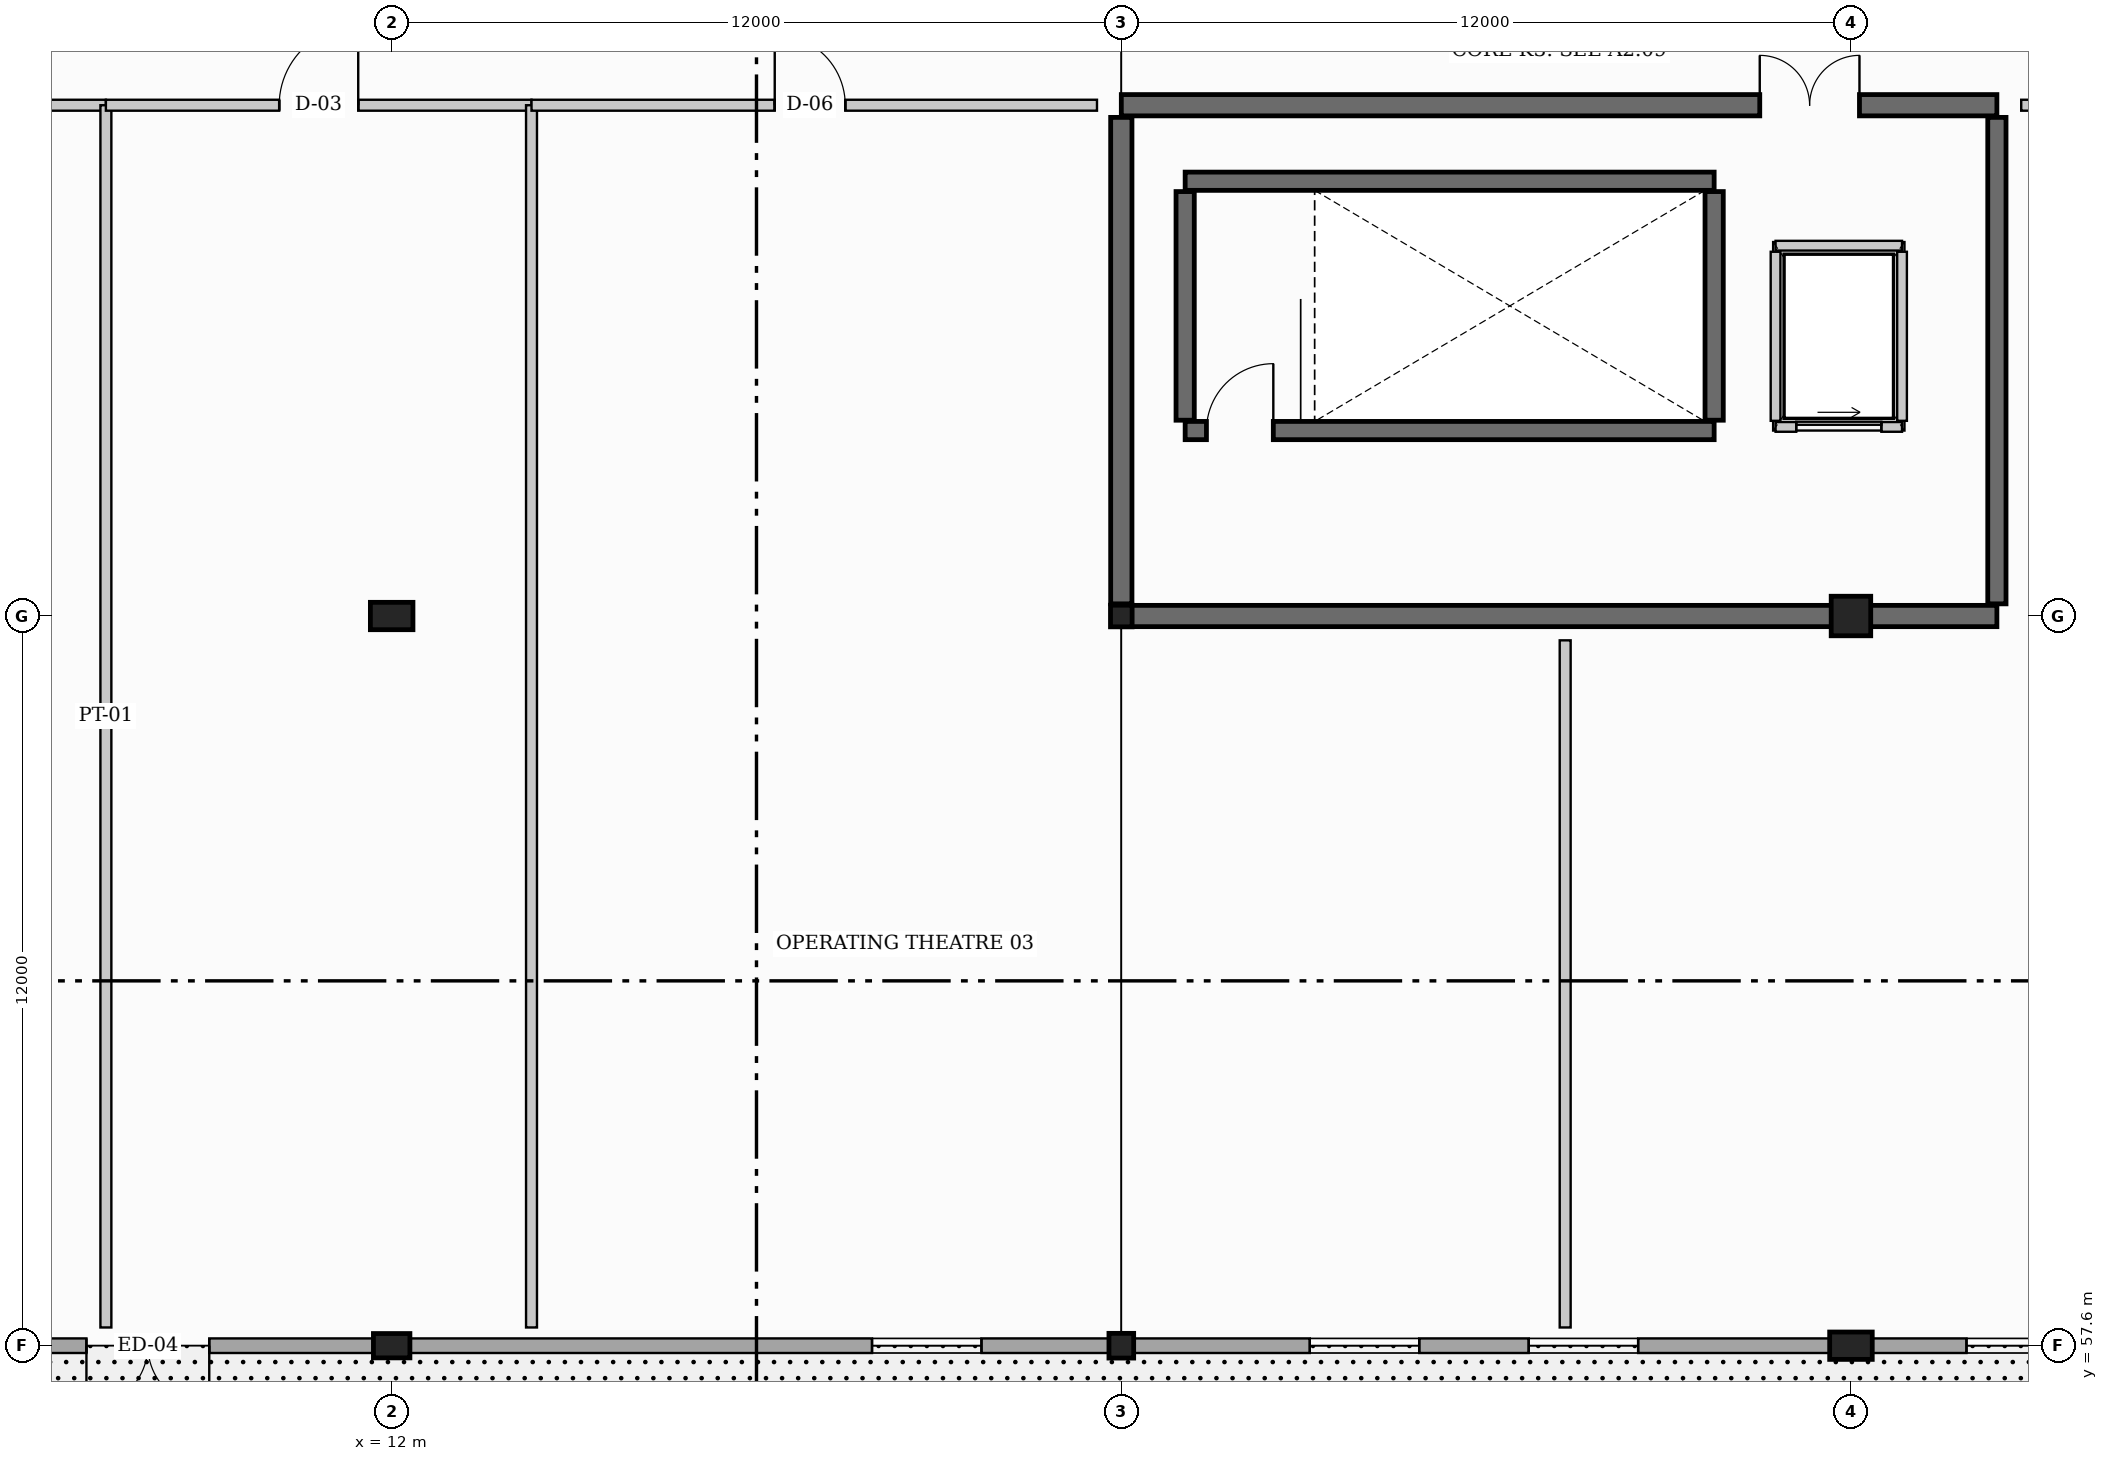
"""IFC4 building model, lengths in metres.
Left out: names, types, materials, properties, quantities, classifications, styles, units other than length and angle.
Written with IfcOpenShell. Run it as: python <this file> out.ifc"""

import sys

from ifc_helpers import new_model, si_unit, direction, frame, frame_2d, origin, origin_2d, place, context, subcontext, project, spatial, rectangle, hollow_circle, extrude, element, fill, save


model = new_model("IFC4")
c1 = context("Model", 3, precision=1e-05, world=origin(), true_north=direction((0.0, 1.0)))
c2 = subcontext(c1, "Body", "Model", "MODEL_VIEW")
j1 = project(units=[si_unit("LENGTHUNIT", "METRE"), si_unit("PLANEANGLEUNIT", "RADIAN")], contexts=[c1])
p1 = place(None, origin())
s1 = spatial("IfcSite", under=j1, at=p1, CompositionType="ELEMENT")
p2 = place(p1, origin())
s2 = spatial("IfcBuilding", under=s1, at=p2, CompositionType="ELEMENT")
p3 = place(p2, frame((0.0, 0.0, 9.6)))
s3 = spatial("IfcBuildingStorey", under=s2, at=p3, CompositionType="ELEMENT", Elevation=9.6)
p4 = place(p3, frame((12.0, 57.6, 0.0), z_axis=(0.0, 0.0, 1.0), x_axis=(0.0, 1.0, 0.0)))
e1 = element("IfcColumn", 1, at=p4, inside=s3, PredefinedType="PILASTER", context=c2, shape_type="SweptSolid", body=[
    extrude(rectangle(XDim=0.4, YDim=0.6, at=origin_2d()), origin(), (0.0, 0.0, 1.0), 4.8),
])
p5 = place(p3, frame((12.0, 69.6, 0.0), z_axis=(0.0, 0.0, 1.0), x_axis=(0.0, 1.0, 0.0)))
e2 = element("IfcColumn", 2, at=p5, inside=s3, PredefinedType="PILASTER", context=c2, shape_type="SweptSolid", body=[
    extrude(rectangle(XDim=0.45, YDim=0.7, at=origin_2d()), origin(), (0.0, 0.0, 1.0), 4.8),
])
p6 = place(p3, frame((24.0, 57.6, 0.0), z_axis=(0.0, 0.0, 1.0), x_axis=(1.0, 0.0, 0.0)))
e3 = element("IfcColumn", 3, at=p6, inside=s3, PredefinedType="COLUMN", context=c2, shape_type="SweptSolid", body=[
    extrude(hollow_circle(Radius=0.203, WallThickness=0.016, at=origin_2d()), origin(), (0.0, 0.0, 1.0), 4.8),
])
p7 = place(p3, frame((24.0, 69.6, 0.0), z_axis=(0.0, 0.0, 1.0), x_axis=(1.0, 0.0, 0.0)))
e4 = element("IfcColumn", 4, at=p7, inside=s3, PredefinedType="COLUMN", context=c2, shape_type="SweptSolid", body=[
    extrude(hollow_circle(Radius=0.178, WallThickness=0.013, at=origin_2d()), origin(), (0.0, 0.0, 1.0), 4.8),
])
p8 = place(p3, frame((36.0, 57.6, 0.0), z_axis=(0.0, 0.0, 1.0), x_axis=(0.0, 1.0, 0.0)))
e5 = element("IfcColumn", 5, at=p8, inside=s3, PredefinedType="PILASTER", context=c2, shape_type="SweptSolid", body=[
    extrude(rectangle(XDim=0.45, YDim=0.7, at=origin_2d()), origin(), (0.0, 0.0, 1.0), 4.8),
])
p9 = place(p3, frame((36.0, 69.6, 0.0), z_axis=(0.0, 0.0, 1.0), x_axis=(0.0, 1.0, 0.0)))
e6 = element("IfcColumn", 6, at=p9, inside=s3, PredefinedType="COLUMN", context=c2, shape_type="SweptSolid", body=[
    extrude(rectangle(XDim=0.65, YDim=0.65, at=origin_2d()), origin(), (0.0, 0.0, 1.0), 4.8),
])
p10 = place(p3, frame((24.0, 78.0, 0.0), z_axis=(0.0, 0.0, 1.0), x_axis=(1.0, 0.0, 0.0)))
e7 = element("IfcWall", 7, at=p10, inside=s3, PredefinedType="SHEAR", context=c2, shape_type="SweptSolid", body=[
    extrude(rectangle(XDim=14.4, YDim=0.35, at=frame_2d((7.2, 0.0))), origin(), (0.0, 0.0, 1.0), 4.8),
])
p11 = place(p10, frame((10.5, 0.0, 0.0)))
e8 = element("IfcOpeningElement", 8, at=p11, cuts=e7, PredefinedType="OPENING", context=c2, shape_type="SweptSolid", body=[
    extrude(rectangle(XDim=1.64, YDim=2.2, at=frame_2d((0.82, 1.1))), frame((0.0, 0.185, 0.0), z_axis=(0.0, -1.0, 0.0), x_axis=(1.0, 0.0, 0.0)), (0.0, 0.0, 1.0), 0.37),
])
p12 = place(p3, frame((38.4, 69.6, 0.0), z_axis=(0.0, 0.0, 1.0), x_axis=(-1.0, 0.0, 0.0)))
e9 = element("IfcWall", 9, at=p12, inside=s3, PredefinedType="SHEAR", context=c2, shape_type="SweptSolid", body=[
    extrude(rectangle(XDim=14.4, YDim=0.35, at=frame_2d((7.2, 0.0))), origin(), (0.0, 0.0, 1.0), 4.8),
])
p13 = place(p3, frame((24.0, 69.8, 0.0), z_axis=(0.0, 0.0, 1.0), x_axis=(0.0, 1.0, 0.0)))
e10 = element("IfcWall", 10, at=p13, inside=s3, PredefinedType="SHEAR", context=c2, shape_type="SweptSolid", body=[
    extrude(rectangle(XDim=8.0, YDim=0.35, at=frame_2d((4.0, 0.0))), origin(), (0.0, 0.0, 1.0), 4.8),
])
p14 = place(p3, frame((38.4, 77.8, 0.0), z_axis=(0.0, 0.0, 1.0), x_axis=(0.0, -1.0, 0.0)))
e11 = element("IfcWall", 11, at=p14, inside=s3, PredefinedType="SHEAR", context=c2, shape_type="SweptSolid", body=[
    extrude(rectangle(XDim=8.0, YDim=0.3, at=frame_2d((4.0, 0.0))), origin(), (0.0, 0.0, 1.0), 4.8),
])
p15 = place(p3, frame((25.05, 72.65, 0.0), z_axis=(0.0, 0.0, 1.0), x_axis=(1.0, 0.0, 0.0)))
e12 = element("IfcWall", 12, at=p15, inside=s3, PredefinedType="SHEAR", context=c2, shape_type="SweptSolid", body=[
    extrude(rectangle(XDim=8.7, YDim=0.3, at=frame_2d((4.35, 0.0))), origin(), (0.0, 0.0, 1.0), 4.8),
])
p16 = place(p15, frame((0.35, 0.0, 0.0)))
e13 = element("IfcOpeningElement", 13, at=p16, cuts=e12, PredefinedType="OPENING", context=c2, shape_type="SweptSolid", body=[
    extrude(rectangle(XDim=1.1, YDim=2.15, at=frame_2d((0.55, 1.075))), frame((0.0, 0.16, 0.0), z_axis=(0.0, -1.0, 0.0), x_axis=(1.0, 0.0, 0.0)), (0.0, 0.0, 1.0), 0.32),
])
p17 = place(p3, frame((33.75, 76.75, 0.0), z_axis=(0.0, 0.0, 1.0), x_axis=(-1.0, 0.0, 0.0)))
e14 = element("IfcWall", 14, at=p17, inside=s3, PredefinedType="SHEAR", context=c2, shape_type="SweptSolid", body=[
    extrude(rectangle(XDim=8.7, YDim=0.3, at=frame_2d((4.35, 0.0))), origin(), (0.0, 0.0, 1.0), 4.8),
])
for number, where, z_axis, x_axis in (
    (15, (25.05, 72.82, 0.0), (0.0, 0.0, 1.0), (0.0, 1.0, 0.0)),
    (16, (33.75, 72.82, 0.0), (0.0, 0.0, 1.0), (0.0, 1.0, 0.0)),
):
    element("IfcWall", number, at=place(p3, frame(where, z_axis=z_axis, x_axis=x_axis)), inside=s3, PredefinedType="SHEAR", context=c2, shape_type="SweptSolid", body=[
        extrude(rectangle(XDim=3.76, YDim=0.3, at=frame_2d((1.88, 0.0))), origin(), (0.0, 0.0, 1.0), 4.8),
    ])
p18 = place(p3, frame((48.0, 57.6, 0.0), z_axis=(0.0, 0.0, 1.0), x_axis=(-1.0, 0.0, 0.0)))
e17 = element("IfcWall", 17, at=p18, inside=s3, PredefinedType="STANDARD", context=c2, shape_type="SweptSolid", body=[
    extrude(rectangle(XDim=48.0, YDim=0.24, at=frame_2d((24.0, 0.0))), origin(), (0.0, 0.0, 1.0), 3.465),
])
p19 = place(p18, frame((39.0, 0.0, 0.0)))
e18 = element("IfcOpeningElement", 18, at=p19, cuts=e17, PredefinedType="OPENING", context=c2, shape_type="SweptSolid", body=[
    extrude(rectangle(XDim=2.02, YDim=2.2, at=frame_2d((1.01, 1.1))), frame((0.0, 0.13, 0.0), z_axis=(0.0, -1.0, 0.0), x_axis=(1.0, 0.0, 0.0)), (0.0, 0.0, 1.0), 0.26),
])
p20 = place(p18, frame((1.1, 0.0, 2.1)))
e19 = element("IfcOpeningElement", 19, at=p20, cuts=e17, PredefinedType="OPENING", context=c2, shape_type="SweptSolid", body=[
    extrude(rectangle(XDim=1.8, YDim=0.9, at=frame_2d((0.9, 0.45))), frame((0.0, 0.13, 0.0), z_axis=(0.0, -1.0, 0.0), x_axis=(1.0, 0.0, 0.0)), (0.0, 0.0, 1.0), 0.26),
])
p21 = place(p18, frame((8.3, 0.0, 2.1)))
e20 = element("IfcOpeningElement", 20, at=p21, cuts=e17, PredefinedType="OPENING", context=c2, shape_type="SweptSolid", body=[
    extrude(rectangle(XDim=1.8, YDim=0.9, at=frame_2d((0.9, 0.45))), frame((0.0, 0.13, 0.0), z_axis=(0.0, -1.0, 0.0), x_axis=(1.0, 0.0, 0.0)), (0.0, 0.0, 1.0), 0.26),
])
p22 = place(p18, frame((15.5, 0.0, 2.1)))
e21 = element("IfcOpeningElement", 21, at=p22, cuts=e17, PredefinedType="OPENING", context=c2, shape_type="SweptSolid", body=[
    extrude(rectangle(XDim=1.8, YDim=0.9, at=frame_2d((0.9, 0.45))), frame((0.0, 0.13, 0.0), z_axis=(0.0, -1.0, 0.0), x_axis=(1.0, 0.0, 0.0)), (0.0, 0.0, 1.0), 0.26),
])
p23 = place(p18, frame((19.1, 0.0, 2.1)))
e22 = element("IfcOpeningElement", 22, at=p23, cuts=e17, PredefinedType="OPENING", context=c2, shape_type="SweptSolid", body=[
    extrude(rectangle(XDim=1.8, YDim=0.9, at=frame_2d((0.9, 0.45))), frame((0.0, 0.13, 0.0), z_axis=(0.0, -1.0, 0.0), x_axis=(1.0, 0.0, 0.0)), (0.0, 0.0, 1.0), 0.26),
])
p24 = place(p18, frame((26.3, 0.0, 2.1)))
e23 = element("IfcOpeningElement", 23, at=p24, cuts=e17, PredefinedType="OPENING", context=c2, shape_type="SweptSolid", body=[
    extrude(rectangle(XDim=1.8, YDim=0.9, at=frame_2d((0.9, 0.45))), frame((0.0, 0.13, 0.0), z_axis=(0.0, -1.0, 0.0), x_axis=(1.0, 0.0, 0.0)), (0.0, 0.0, 1.0), 0.26),
])
p25 = place(p18, frame((44.3, 0.0, 2.1)))
e24 = element("IfcOpeningElement", 24, at=p25, cuts=e17, PredefinedType="OPENING", context=c2, shape_type="SweptSolid", body=[
    extrude(rectangle(XDim=1.8, YDim=0.9, at=frame_2d((0.9, 0.45))), frame((0.0, 0.13, 0.0), z_axis=(0.0, -1.0, 0.0), x_axis=(1.0, 0.0, 0.0)), (0.0, 0.0, 1.0), 0.26),
])
p26 = place(p3, frame((34.76, 72.71, 0.0), z_axis=(0.0, 0.0, 1.0), x_axis=(1.0, 0.0, 0.0)))
e25 = element("IfcWall", 25, at=p26, inside=s3, PredefinedType="PARTITIONING", context=c2, shape_type="SweptSolid", body=[
    extrude(rectangle(XDim=2.08, YDim=0.16, at=frame_2d((1.04, 0.0))), origin(), (0.0, 0.0, 1.0), 4.43),
])
p27 = place(p26, frame((0.34, 0.0, 0.0)))
e26 = element("IfcOpeningElement", 26, at=p27, cuts=e25, PredefinedType="OPENING", context=c2, shape_type="SweptSolid", body=[
    extrude(rectangle(XDim=1.4, YDim=2.2, at=frame_2d((0.7, 1.1))), frame((0.0, 0.09, 0.0), z_axis=(0.0, -1.0, 0.0), x_axis=(1.0, 0.0, 0.0)), (0.0, 0.0, 1.0), 0.18),
])
p28 = place(p3, frame((36.84, 75.69, 0.0), z_axis=(0.0, 0.0, 1.0), x_axis=(-1.0, 0.0, 0.0)))
e27 = element("IfcWall", 27, at=p28, inside=s3, PredefinedType="PARTITIONING", context=c2, shape_type="SweptSolid", body=[
    extrude(rectangle(XDim=2.08, YDim=0.16, at=frame_2d((1.04, 0.0))), origin(), (0.0, 0.0, 1.0), 4.43),
])
for number, where, z_axis, x_axis in (
    (28, (34.76, 75.59, 0.0), (0.0, 0.0, 1.0), (0.0, -1.0, 0.0)),
    (29, (36.84, 72.81, 0.0), (0.0, 0.0, 1.0), (0.0, 1.0, 0.0)),
):
    element("IfcWall", number, at=place(p3, frame(where, z_axis=z_axis, x_axis=x_axis)), inside=s3, PredefinedType="PARTITIONING", context=c2, shape_type="SweptSolid", body=[
        extrude(rectangle(XDim=2.78, YDim=0.16, at=frame_2d((1.39, 0.0))), origin(), (0.0, 0.0, 1.0), 4.43),
    ])
p29 = place(p3, frame((0.3, 78.0, 0.0), z_axis=(0.0, 0.0, 1.0), x_axis=(1.0, 0.0, 0.0)))
e30 = element("IfcWall", 30, at=p29, inside=s3, PredefinedType="PARTITIONING", context=c2, shape_type="SweptSolid", body=[
    extrude(rectangle(XDim=7.0, YDim=0.18, at=frame_2d((3.5, 0.0))), origin(), (0.0, 0.0, 1.0), 4.065),
])
p30 = place(p29, frame((2.85, 0.0, 0.0)))
e31 = element("IfcOpeningElement", 31, at=p30, cuts=e30, PredefinedType="OPENING", context=c2, shape_type="SweptSolid", body=[
    extrude(rectangle(XDim=1.42, YDim=2.22, at=frame_2d((0.71, 1.11))), frame((0.0, 0.1, 0.0), z_axis=(0.0, -1.0, 0.0), x_axis=(1.0, 0.0, 0.0)), (0.0, 0.0, 1.0), 0.2),
])
p31 = place(p3, frame((7.3, 57.9, 0.0), z_axis=(0.0, 0.0, 1.0), x_axis=(0.0, 1.0, 0.0)))
e32 = element("IfcWall", 32, at=p31, inside=s3, PredefinedType="PARTITIONING", context=c2, shape_type="SweptSolid", body=[
    extrude(rectangle(XDim=20.1, YDim=0.18, at=frame_2d((10.05, 0.0))), origin(), (0.0, 0.0, 1.0), 3.882),
])
p32 = place(p3, frame((7.3, 78.0, 0.0), z_axis=(0.0, 0.0, 1.0), x_axis=(1.0, 0.0, 0.0)))
e33 = element("IfcWall", 33, at=p32, inside=s3, PredefinedType="PARTITIONING", context=c2, shape_type="SweptSolid", body=[
    extrude(rectangle(XDim=7.0, YDim=0.18, at=frame_2d((3.5, 0.0))), origin(), (0.0, 0.0, 1.0), 3.465),
])
p33 = place(p32, frame((2.85, 0.0, 0.0)))
e34 = element("IfcOpeningElement", 34, at=p33, cuts=e33, PredefinedType="OPENING", context=c2, shape_type="SweptSolid", body=[
    extrude(rectangle(XDim=1.3, YDim=2.16, at=frame_2d((0.65, 1.08))), frame((0.0, 0.1, 0.0), z_axis=(0.0, -1.0, 0.0), x_axis=(1.0, 0.0, 0.0)), (0.0, 0.0, 1.0), 0.2),
])
p34 = place(p3, frame((14.3, 57.9, 0.0), z_axis=(0.0, 0.0, 1.0), x_axis=(0.0, 1.0, 0.0)))
e35 = element("IfcWall", 35, at=p34, inside=s3, PredefinedType="PARTITIONING", context=c2, shape_type="SweptSolid", body=[
    extrude(rectangle(XDim=20.1, YDim=0.18, at=frame_2d((10.05, 0.0))), origin(), (0.0, 0.0, 1.0), 3.887),
])
p35 = place(p3, frame((14.3, 78.0, 0.0), z_axis=(0.0, 0.0, 1.0), x_axis=(1.0, 0.0, 0.0)))
e36 = element("IfcWall", 36, at=p35, inside=s3, PredefinedType="PARTITIONING", context=c2, shape_type="SweptSolid", body=[
    extrude(rectangle(XDim=9.3, YDim=0.18, at=frame_2d((4.65, 0.0))), origin(), (0.0, 0.0, 1.0), 4.43),
])
p36 = place(p35, frame((4.0, 0.0, 0.0)))
e37 = element("IfcOpeningElement", 37, at=p36, cuts=e36, PredefinedType="OPENING", context=c2, shape_type="SweptSolid", body=[
    extrude(rectangle(XDim=1.16, YDim=2.1, at=frame_2d((0.58, 1.05))), frame((0.0, 0.1, 0.0), z_axis=(0.0, -1.0, 0.0), x_axis=(1.0, 0.0, 0.0)), (0.0, 0.0, 1.0), 0.2),
])
p37 = place(p3, frame((31.3, 57.9, 0.0), z_axis=(0.0, 0.0, 1.0), x_axis=(0.0, 1.0, 0.0)))
e38 = element("IfcWall", 38, at=p37, inside=s3, PredefinedType="PARTITIONING", context=c2, shape_type="SweptSolid", body=[
    extrude(rectangle(XDim=11.3, YDim=0.18, at=frame_2d((5.65, 0.0))), origin(), (0.0, 0.0, 1.0), 3.955),
])
p38 = place(p3, frame((38.8, 78.0, 0.0), z_axis=(0.0, 0.0, 1.0), x_axis=(1.0, 0.0, 0.0)))
e39 = element("IfcWall", 39, at=p38, inside=s3, PredefinedType="PARTITIONING", context=c2, shape_type="SweptSolid", body=[
    extrude(rectangle(XDim=8.9, YDim=0.18, at=frame_2d((4.45, 0.0))), origin(), (0.0, 0.0, 1.0), 4.135),
])
p39 = place(p38, frame((3.8, 0.0, 0.0)))
e40 = element("IfcOpeningElement", 40, at=p39, cuts=e39, PredefinedType="OPENING", context=c2, shape_type="SweptSolid", body=[
    extrude(rectangle(XDim=1.64, YDim=2.2, at=frame_2d((0.82, 1.1))), frame((0.0, 0.1, 0.0), z_axis=(0.0, -1.0, 0.0), x_axis=(1.0, 0.0, 0.0)), (0.0, 0.0, 1.0), 0.2),
])
p40 = place(p19, origin())
e41 = element("IfcDoor", 41, at=p40, inside=s3, OperationType="DOUBLE_DOOR_SINGLE_SWING", PredefinedType="DOOR", context=c2, shape_type="SweptSolid", body=[
    extrude(rectangle(XDim=2.02, YDim=2.2, at=frame_2d((1.01, 1.1))), frame((0.0, 0.025, 0.0), z_axis=(0.0, -1.0, 0.0), x_axis=(1.0, 0.0, 0.0)), (0.0, 0.0, 1.0), 0.05),
])
fill(e18, e41)
p41 = place(p21, origin())
e42 = element("IfcWindow", 42, at=p41, inside=s3, PartitioningType="DOUBLE_PANEL_HORIZONTAL", PredefinedType="WINDOW", context=c2, shape_type="SweptSolid", body=[
    extrude(rectangle(XDim=1.8, YDim=0.9, at=frame_2d((0.9, 0.45))), frame((0.0, 0.03, 0.0), z_axis=(0.0, -1.0, 0.0), x_axis=(1.0, 0.0, 0.0)), (0.0, 0.0, 1.0), 0.06),
])
fill(e20, e42)
p42 = place(p22, origin())
e43 = element("IfcWindow", 43, at=p42, inside=s3, PartitioningType="DOUBLE_PANEL_HORIZONTAL", PredefinedType="WINDOW", context=c2, shape_type="SweptSolid", body=[
    extrude(rectangle(XDim=1.8, YDim=0.9, at=frame_2d((0.9, 0.45))), frame((0.0, 0.03, 0.0), z_axis=(0.0, -1.0, 0.0), x_axis=(1.0, 0.0, 0.0)), (0.0, 0.0, 1.0), 0.06),
])
fill(e21, e43)
p43 = place(p23, origin())
e44 = element("IfcWindow", 44, at=p43, inside=s3, PartitioningType="DOUBLE_PANEL_HORIZONTAL", PredefinedType="WINDOW", context=c2, shape_type="SweptSolid", body=[
    extrude(rectangle(XDim=1.8, YDim=0.9, at=frame_2d((0.9, 0.45))), frame((0.0, 0.03, 0.0), z_axis=(0.0, -1.0, 0.0), x_axis=(1.0, 0.0, 0.0)), (0.0, 0.0, 1.0), 0.06),
])
fill(e22, e44)
p44 = place(p24, origin())
e45 = element("IfcWindow", 45, at=p44, inside=s3, PartitioningType="DOUBLE_PANEL_HORIZONTAL", PredefinedType="WINDOW", context=c2, shape_type="SweptSolid", body=[
    extrude(rectangle(XDim=1.8, YDim=0.9, at=frame_2d((0.9, 0.45))), frame((0.0, 0.03, 0.0), z_axis=(0.0, -1.0, 0.0), x_axis=(1.0, 0.0, 0.0)), (0.0, 0.0, 1.0), 0.06),
])
fill(e23, e45)
p45 = place(p27, origin())
e46 = element("IfcDoor", 46, at=p45, inside=s3, OperationType="SLIDING_TO_RIGHT", PredefinedType="DOOR", context=c2, shape_type="SweptSolid", body=[
    extrude(rectangle(XDim=1.4, YDim=2.2, at=frame_2d((0.7, 1.1))), frame((0.0, 0.025, 0.0), z_axis=(0.0, -1.0, 0.0), x_axis=(1.0, 0.0, 0.0)), (0.0, 0.0, 1.0), 0.05),
])
fill(e26, e46)
p46 = place(p16, origin())
e47 = element("IfcDoor", 47, at=p46, inside=s3, OperationType="SINGLE_SWING_RIGHT", PredefinedType="DOOR", context=c2, shape_type="SweptSolid", body=[
    extrude(rectangle(XDim=1.1, YDim=2.15, at=frame_2d((0.55, 1.075))), frame((0.0, 0.025, 0.0), z_axis=(0.0, -1.0, 0.0), x_axis=(1.0, 0.0, 0.0)), (0.0, 0.0, 1.0), 0.05),
])
fill(e13, e47)
p47 = place(p11, origin())
e48 = element("IfcDoor", 48, at=p47, inside=s3, OperationType="DOUBLE_DOOR_SINGLE_SWING", PredefinedType="DOOR", context=c2, shape_type="SweptSolid", body=[
    extrude(rectangle(XDim=1.64, YDim=2.2, at=frame_2d((0.82, 1.1))), frame((0.0, 0.025, 0.0), z_axis=(0.0, -1.0, 0.0), x_axis=(1.0, 0.0, 0.0)), (0.0, 0.0, 1.0), 0.05),
])
fill(e8, e48)
p48 = place(p33, origin())
e49 = element("IfcDoor", 49, at=p48, inside=s3, OperationType="SINGLE_SWING_RIGHT", PredefinedType="DOOR", context=c2, shape_type="SweptSolid", body=[
    extrude(rectangle(XDim=1.3, YDim=2.16, at=frame_2d((0.65, 1.08))), frame((0.0, 0.025, 0.0), z_axis=(0.0, -1.0, 0.0), x_axis=(1.0, 0.0, 0.0)), (0.0, 0.0, 1.0), 0.05),
])
fill(e34, e49)
p49 = place(p36, origin())
e50 = element("IfcDoor", 50, at=p49, inside=s3, OperationType="SINGLE_SWING_LEFT", PredefinedType="DOOR", context=c2, shape_type="SweptSolid", body=[
    extrude(rectangle(XDim=1.16, YDim=2.1, at=frame_2d((0.58, 1.05))), frame((0.0, 0.025, 0.0), z_axis=(0.0, -1.0, 0.0), x_axis=(1.0, 0.0, 0.0)), (0.0, 0.0, 1.0), 0.05),
])
fill(e37, e50)
save(model, sys.argv[1])
